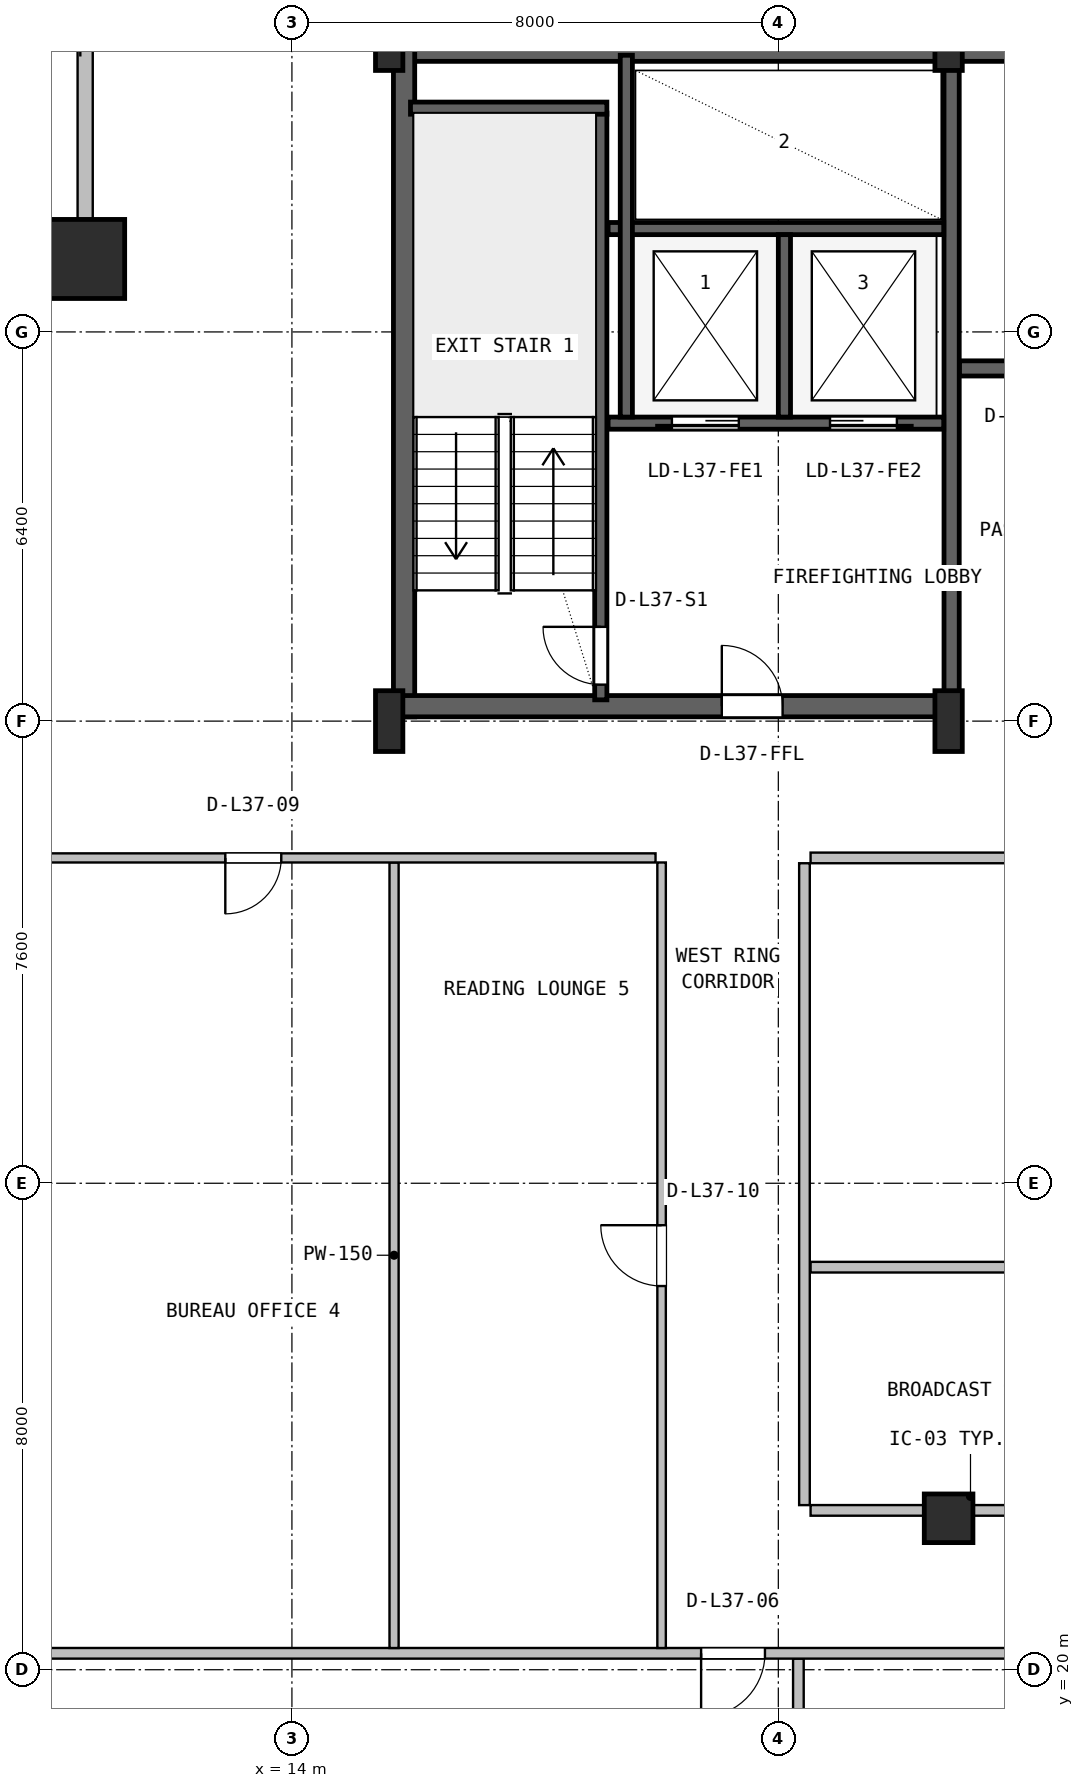
"""IFC4 building model, lengths in metres.
Left out: names, types, materials, properties, quantities, classifications, styles, units other than length and angle.
Written with IfcOpenShell. Run it as: python <this file> out.ifc"""

import sys

from ifc_helpers import new_model, si_unit, direction, frame, frame_2d, origin, origin_2d, place, context, subcontext, project, spatial, rectangle, hollow_rectangle, i_section, extrude, source, transform, mapped, element, fill, save


model = new_model("IFC4")
c1 = context("Model", 3, precision=1e-05, world=origin(), true_north=direction((0.0, 1.0)))
c2 = subcontext(c1, "Body", "Model", "MODEL_VIEW")
j1 = project(units=[si_unit("LENGTHUNIT", "METRE"), si_unit("PLANEANGLEUNIT", "RADIAN")], contexts=[c1])
p1 = place(None, origin())
s1 = spatial("IfcSite", under=j1, at=p1, CompositionType="ELEMENT")
p2 = place(p1, origin())
s2 = spatial("IfcBuilding", under=s1, at=p2, CompositionType="ELEMENT")
p3 = place(p2, frame((0.0, 0.0, 153.4)))
s3 = spatial("IfcBuildingStorey", under=s2, at=p3, CompositionType="ELEMENT", Elevation=153.4)
p4 = place(p3, frame((15.6, 46.625, 0.0), z_axis=(0.0, 0.0, 1.0), x_axis=(1.0, 0.0, 0.0)))
e1 = element("IfcWall", 1, at=p4, inside=s3, PredefinedType="SHEAR", context=c2, shape_type="SweptSolid", body=[
    extrude(rectangle(XDim=36.8, YDim=0.35, at=frame_2d((18.4, 0.0))), origin(), (0.0, 0.0, 1.0), 3.55),
])
p5 = place(p3, frame((15.845, 35.67, 0.0), z_axis=(0.0, 0.0, 1.0), x_axis=(0.0, 1.0, 0.0)))
e2 = element("IfcWall", 2, at=p5, inside=s3, PredefinedType="SHEAR", context=c2, shape_type="SweptSolid", body=[
    extrude(rectangle(XDim=11.13, YDim=0.35, at=frame_2d((5.565, 0.0))), origin(), (0.0, 0.0, 1.0), 3.55),
])
p6 = place(p3, frame((15.67, 35.845, 0.0), z_axis=(0.0, 0.0, 1.0), x_axis=(1.0, 0.0, 0.0)))
e3 = element("IfcWall", 3, at=p6, inside=s3, PredefinedType="SHEAR", context=c2, shape_type="SweptSolid", body=[
    extrude(rectangle(XDim=9.13, YDim=0.35, at=frame_2d((4.565, 0.0))), origin(), (0.0, 0.0, 1.0), 3.55),
])
p7 = place(p6, frame((5.4, 0.0, 0.0)))
e4 = element("IfcOpeningElement", 4, at=p7, cuts=e3, PredefinedType="OPENING", context=c2, shape_type="SweptSolid", body=[
    extrude(rectangle(XDim=1.0, YDim=2.1, at=frame_2d((0.5, 1.05))), frame((0.0, 0.185, 0.0), z_axis=(0.0, -1.0, 0.0), x_axis=(1.0, 0.0, 0.0)), (0.0, 0.0, 1.0), 0.37),
])
m1 = source(origin(), c2, "Body", "SweptSolid", [
    extrude(i_section(OverallWidth=0.45, OverallDepth=1.0, WebThickness=0.016, FlangeThickness=0.03, FilletRadius=0.016, at=origin_2d()), origin(), (0.0, 0.0, 1.0), 3.8),
])
for number, where, z_axis, x_axis in (
    (5, (15.6, 35.6, 0.0), (0.0, 0.0, 1.0), (1.0, 0.0, 0.0)),
    (6, (15.6, 46.8, 0.0), (0.0, 0.0, 1.0), (1.0, 0.0, 0.0)),
    (7, (24.8, 35.6, 0.0), (0.0, 0.0, 1.0), (1.0, 0.0, 0.0)),
    (8, (24.8, 46.8, 0.0), (0.0, 0.0, 1.0), (1.0, 0.0, 0.0)),
):
    element("IfcColumn", number, at=place(p3, frame(where, z_axis=z_axis, x_axis=x_axis)), inside=s3, PredefinedType="COLUMN", context=c2, shape_type="MappedRepresentation", body=[
        mapped(m1, transform((0.0, 0.0, 0.0), x_axis=(1.0, 0.0, 0.0), y_axis=(0.0, 1.0, 0.0), z_axis=(0.0, 0.0, 1.0), scale=1.0)),
    ])
m2 = source(origin(), c2, "Body", "SweptSolid", [
    extrude(hollow_rectangle(XDim=1.3, YDim=1.3, WallThickness=0.05, at=origin_2d()), origin(), (0.0, 0.0, 1.0), 3.8),
])
p8 = place(p3, frame((10.6, 43.2, 0.0), z_axis=(0.0, 0.0, 1.0), x_axis=(1.0, 0.0, 0.0)))
e9 = element("IfcColumn", 9, at=p8, inside=s3, PredefinedType="COLUMN", context=c2, shape_type="MappedRepresentation", body=[
    mapped(m2, transform((0.0, 0.0, 0.0), x_axis=(1.0, 0.0, 0.0), y_axis=(0.0, 1.0, 0.0), z_axis=(0.0, 0.0, 1.0), scale=1.0)),
])
m3 = source(origin(), c2, "Body", "SweptSolid", [
    extrude(rectangle(XDim=0.8, YDim=0.8, at=origin_2d()), origin(), (0.0, 0.0, 1.0), 3.8),
])
p9 = place(p3, frame((24.8, 22.49, 0.0), z_axis=(0.0, 0.0, 1.0), x_axis=(1.0, 0.0, 0.0)))
e10 = element("IfcColumn", 10, at=p9, inside=s3, PredefinedType="COLUMN", context=c2, shape_type="MappedRepresentation", body=[
    mapped(m3, transform((0.0, 0.0, 0.0), x_axis=(1.0, 0.0, 0.0), y_axis=(0.0, 1.0, 0.0), z_axis=(0.0, 0.0, 1.0), scale=1.0)),
])
p10 = place(p3, frame((7.08, 43.2, 0.0), z_axis=(0.0, 0.0, 1.0), x_axis=(1.0, 0.0, 0.0)))
e11 = element("IfcWall", 11, at=p10, inside=s3, PredefinedType="SOLIDWALL", context=c2, shape_type="SweptSolid", body=[
    extrude(rectangle(XDim=3.39, YDim=0.25, at=frame_2d((1.695, 0.0))), origin(), (0.0, 0.0, 1.0), 3.53),
])
p11 = place(p3, frame((10.6, 43.12, 0.0), z_axis=(0.0, 0.0, 1.0), x_axis=(0.0, 1.0, 0.0)))
e12 = element("IfcWall", 12, at=p11, inside=s3, PredefinedType="SOLIDWALL", context=c2, shape_type="SweptSolid", body=[
    extrude(rectangle(XDim=3.6, YDim=0.25, at=frame_2d((1.8, 0.0))), origin(), (0.0, 0.0, 1.0), 3.108),
])
p12 = place(p3, frame((19.08, 35.95, 0.0), z_axis=(0.0, 0.0, 1.0), x_axis=(0.0, 1.0, 0.0)))
e13 = element("IfcWall", 13, at=p12, inside=s3, PredefinedType="SHEAR", context=c2, shape_type="SweptSolid", body=[
    extrude(rectangle(XDim=9.65, YDim=0.2, at=frame_2d((4.825, 0.0))), origin(), (0.0, 0.0, 1.0), 3.55),
])
p13 = place(p12, frame((0.25, 0.0, 0.0)))
e14 = element("IfcOpeningElement", 14, at=p13, cuts=e13, PredefinedType="OPENING", context=c2, shape_type="SweptSolid", body=[
    extrude(rectangle(XDim=0.95, YDim=2.1, at=frame_2d((0.475, 1.05))), frame((0.0, 0.11, 0.0), z_axis=(0.0, -1.0, 0.0), x_axis=(1.0, 0.0, 0.0)), (0.0, 0.0, 1.0), 0.22),
])
p14 = place(p3, frame((15.95, 45.68, 0.0), z_axis=(0.0, 0.0, 1.0), x_axis=(1.0, 0.0, 0.0)))
e15 = element("IfcWall", 15, at=p14, inside=s3, PredefinedType="SHEAR", context=c2, shape_type="SweptSolid", body=[
    extrude(rectangle(XDim=3.23, YDim=0.2, at=frame_2d((1.615, 0.0))), origin(), (0.0, 0.0, 1.0), 3.55),
])
p15 = place(p3, frame((24.85, 36.05, 0.0), z_axis=(0.0, 0.0, 1.0), x_axis=(0.0, 1.0, 0.0)))
e16 = element("IfcWall", 16, at=p15, inside=s3, PredefinedType="SHEAR", context=c2, shape_type="SweptSolid", body=[
    extrude(rectangle(XDim=10.45, YDim=0.25, at=frame_2d((5.225, 0.0))), origin(), (0.0, 0.0, 1.0), 3.55),
])
p16 = place(p3, frame((19.2, 40.5, 0.0), z_axis=(0.0, 0.0, 1.0), x_axis=(1.0, 0.0, 0.0)))
e17 = element("IfcWall", 17, at=p16, inside=s3, PredefinedType="SHEAR", context=c2, shape_type="SweptSolid", body=[
    extrude(rectangle(XDim=5.52, YDim=0.2, at=frame_2d((2.76, 0.0))), origin(), (0.0, 0.0, 1.0), 3.55),
])
p17 = place(p16, frame((1.05, 0.0, 0.0)))
e18 = element("IfcOpeningElement", 18, at=p17, cuts=e17, PredefinedType="OPENING", context=c2, shape_type="SweptSolid", body=[
    extrude(rectangle(XDim=1.1, YDim=2.18, at=frame_2d((0.55, 1.09))), frame((0.0, 0.11, 0.0), z_axis=(0.0, -1.0, 0.0), x_axis=(1.0, 0.0, 0.0)), (0.0, 0.0, 1.0), 0.22),
])
p18 = place(p16, frame((3.65, 0.0, 0.0)))
e19 = element("IfcOpeningElement", 19, at=p18, cuts=e17, PredefinedType="OPENING", context=c2, shape_type="SweptSolid", body=[
    extrude(rectangle(XDim=1.1, YDim=2.18, at=frame_2d((0.55, 1.09))), frame((0.0, 0.11, 0.0), z_axis=(0.0, -1.0, 0.0), x_axis=(1.0, 0.0, 0.0)), (0.0, 0.0, 1.0), 0.22),
])
p19 = place(p3, frame((19.2, 43.7, 0.0), z_axis=(0.0, 0.0, 1.0), x_axis=(1.0, 0.0, 0.0)))
e20 = element("IfcWall", 20, at=p19, inside=s3, PredefinedType="SHEAR", context=c2, shape_type="SweptSolid", body=[
    extrude(rectangle(XDim=5.52, YDim=0.2, at=frame_2d((2.76, 0.0))), origin(), (0.0, 0.0, 1.0), 3.55),
])
p20 = place(p3, frame((22.1, 40.6, 0.0), z_axis=(0.0, 0.0, 1.0), x_axis=(0.0, 1.0, 0.0)))
e21 = element("IfcWall", 21, at=p20, inside=s3, PredefinedType="SHEAR", context=c2, shape_type="SweptSolid", body=[
    extrude(rectangle(XDim=3.0, YDim=0.2, at=frame_2d((1.5, 0.0))), origin(), (0.0, 0.0, 1.0), 3.55),
])
p21 = place(p3, frame((19.5, 40.6, 0.0), z_axis=(0.0, 0.0, 1.0), x_axis=(0.0, 1.0, 0.0)))
e22 = element("IfcWall", 22, at=p21, inside=s3, PredefinedType="SHEAR", context=c2, shape_type="SweptSolid", body=[
    extrude(rectangle(XDim=5.95, YDim=0.2, at=frame_2d((2.975, 0.0))), origin(), (0.0, 0.0, 1.0), 3.55),
])
p22 = place(p3, frame((24.98, 41.4, 0.0), z_axis=(0.0, 0.0, 1.0), x_axis=(1.0, 0.0, 0.0)))
e23 = element("IfcWall", 23, at=p22, inside=s3, PredefinedType="SHEAR", context=c2, shape_type="SweptSolid", body=[
    extrude(rectangle(XDim=23.82, YDim=0.25, at=frame_2d((11.91, 0.0))), origin(), (0.0, 0.0, 1.0), 3.55),
])
p23 = place(p22, frame((8.87, 0.0, 0.0)))
e24 = element("IfcOpeningElement", 24, at=p23, cuts=e23, PredefinedType="OPENING", context=c2, shape_type="SweptSolid", body=[
    extrude(rectangle(XDim=1.1, YDim=2.18, at=frame_2d((0.55, 1.09))), frame((0.0, 0.135, 0.0), z_axis=(0.0, -1.0, 0.0), x_axis=(1.0, 0.0, 0.0)), (0.0, 0.0, 1.0), 0.27),
])
p24 = place(p22, frame((11.47, 0.0, 0.0)))
e25 = element("IfcOpeningElement", 25, at=p24, cuts=e23, PredefinedType="OPENING", context=c2, shape_type="SweptSolid", body=[
    extrude(rectangle(XDim=1.1, YDim=2.18, at=frame_2d((0.55, 1.09))), frame((0.0, 0.135, 0.0), z_axis=(0.0, -1.0, 0.0), x_axis=(1.0, 0.0, 0.0)), (0.0, 0.0, 1.0), 0.27),
])
p25 = place(p22, frame((14.07, 0.0, 0.0)))
e26 = element("IfcOpeningElement", 26, at=p25, cuts=e23, PredefinedType="OPENING", context=c2, shape_type="SweptSolid", body=[
    extrude(rectangle(XDim=1.1, YDim=2.18, at=frame_2d((0.55, 1.09))), frame((0.0, 0.135, 0.0), z_axis=(0.0, -1.0, 0.0), x_axis=(1.0, 0.0, 0.0)), (0.0, 0.0, 1.0), 0.27),
])
p26 = place(p22, frame((0.96, 0.0, 0.0)))
e27 = element("IfcOpeningElement", 27, at=p26, cuts=e23, PredefinedType="OPENING", context=c2, shape_type="SweptSolid", body=[
    extrude(rectangle(XDim=1.0, YDim=2.08, at=frame_2d((0.5, 1.04))), frame((0.0, 0.135, 0.0), z_axis=(0.0, -1.0, 0.0), x_axis=(1.0, 0.0, 0.0)), (0.0, 0.0, 1.0), 0.27),
])
p27 = place(p22, frame((3.56, 0.0, 0.0)))
e28 = element("IfcOpeningElement", 28, at=p27, cuts=e23, PredefinedType="OPENING", context=c2, shape_type="SweptSolid", body=[
    extrude(rectangle(XDim=1.0, YDim=2.08, at=frame_2d((0.5, 1.04))), frame((0.0, 0.135, 0.0), z_axis=(0.0, -1.0, 0.0), x_axis=(1.0, 0.0, 0.0)), (0.0, 0.0, 1.0), 0.27),
])
p28 = place(p22, frame((6.16, 0.0, 0.0)))
e29 = element("IfcOpeningElement", 29, at=p28, cuts=e23, PredefinedType="OPENING", context=c2, shape_type="SweptSolid", body=[
    extrude(rectangle(XDim=0.92, YDim=2.08, at=frame_2d((0.46, 1.04))), frame((0.0, 0.135, 0.0), z_axis=(0.0, -1.0, 0.0), x_axis=(1.0, 0.0, 0.0)), (0.0, 0.0, 1.0), 0.27),
])
p29 = place(p3, frame((22.33, 7.38, 0.0), z_axis=(0.0, 0.0, 1.0), x_axis=(0.0, 1.0, 0.0)))
e30 = element("IfcWall", 30, at=p29, inside=s3, PredefinedType="PARTITIONING", context=c2, shape_type="SweptSolid", body=[
    extrude(rectangle(XDim=12.803, YDim=0.175, at=frame_2d((6.402, 0.0))), origin(), (0.0, 0.0, 1.0), 3.108),
])
p30 = place(p3, frame((7.18, 20.27, 0.0), z_axis=(0.0, 0.0, 1.0), x_axis=(1.0, 0.0, 0.0)))
e31 = element("IfcWall", 31, at=p30, inside=s3, PredefinedType="PARTITIONING", context=c2, shape_type="SweptSolid", body=[
    extrude(rectangle(XDim=53.64, YDim=0.175, at=frame_2d((26.82, 0.0))), origin(), (0.0, 0.0, 1.0), 2.909),
])
p31 = place(p30, frame((13.55, 0.0, 0.0)))
e32 = element("IfcOpeningElement", 32, at=p31, cuts=e31, PredefinedType="OPENING", context=c2, shape_type="SweptSolid", body=[
    extrude(rectangle(XDim=1.05, YDim=2.1, at=frame_2d((0.525, 1.05))), frame((0.0, 0.098, 0.0), z_axis=(0.0, -1.0, 0.0), x_axis=(1.0, 0.0, 0.0)), (0.0, 0.0, 1.0), 0.195),
])
p32 = place(p30, frame((25.795, 0.0, 0.0)))
e33 = element("IfcOpeningElement", 33, at=p32, cuts=e31, PredefinedType="OPENING", context=c2, shape_type="SweptSolid", body=[
    extrude(rectangle(XDim=1.4, YDim=2.12, at=frame_2d((0.7, 1.06))), frame((0.0, 0.098, 0.0), z_axis=(0.0, -1.0, 0.0), x_axis=(1.0, 0.0, 0.0)), (0.0, 0.0, 1.0), 0.195),
])
p33 = place(p30, frame((38.475, 0.0, 0.0)))
e34 = element("IfcOpeningElement", 34, at=p33, cuts=e31, PredefinedType="OPENING", context=c2, shape_type="SweptSolid", body=[
    extrude(rectangle(XDim=0.88, YDim=2.06, at=frame_2d((0.44, 1.03))), frame((0.0, 0.098, 0.0), z_axis=(0.0, -1.0, 0.0), x_axis=(1.0, 0.0, 0.0)), (0.0, 0.0, 1.0), 0.195),
])
p34 = place(p3, frame((15.68, 20.357, 0.0), z_axis=(0.0, 0.0, 1.0), x_axis=(0.0, 1.0, 0.0)))
e35 = element("IfcWall", 35, at=p34, inside=s3, PredefinedType="PARTITIONING", context=c2, shape_type="SweptSolid", body=[
    extrude(rectangle(XDim=12.918, YDim=0.15, at=frame_2d((6.459, 0.0))), origin(), (0.0, 0.0, 1.0), 3.222),
])
p35 = place(p3, frame((7.18, 33.35, 0.0), z_axis=(0.0, 0.0, 1.0), x_axis=(1.0, 0.0, 0.0)))
e36 = element("IfcWall", 36, at=p35, inside=s3, PredefinedType="PARTITIONING", context=c2, shape_type="SweptSolid", body=[
    extrude(rectangle(XDim=12.8, YDim=0.15, at=frame_2d((6.4, 0.0))), origin(), (0.0, 0.0, 1.0), 3.108),
])
p36 = place(p35, frame((5.725, 0.0, 0.0)))
e37 = element("IfcOpeningElement", 37, at=p36, cuts=e36, PredefinedType="OPENING", context=c2, shape_type="SweptSolid", body=[
    extrude(rectangle(XDim=0.92, YDim=2.08, at=frame_2d((0.46, 1.04))), frame((0.0, 0.085, 0.0), z_axis=(0.0, -1.0, 0.0), x_axis=(1.0, 0.0, 0.0)), (0.0, 0.0, 1.0), 0.17),
])
p37 = place(p3, frame((20.08, 20.357, 0.0), z_axis=(0.0, 0.0, 1.0), x_axis=(0.0, 1.0, 0.0)))
e38 = element("IfcWall", 38, at=p37, inside=s3, PredefinedType="PARTITIONING", context=c2, shape_type="SweptSolid", body=[
    extrude(rectangle(XDim=12.918, YDim=0.14, at=frame_2d((6.459, 0.0))), origin(), (0.0, 0.0, 1.0), 3.222),
])
p38 = place(p37, frame((5.953, 0.0, 0.0)))
e39 = element("IfcOpeningElement", 39, at=p38, cuts=e38, PredefinedType="OPENING", context=c2, shape_type="SweptSolid", body=[
    extrude(rectangle(XDim=1.0, YDim=2.1, at=frame_2d((0.5, 1.05))), frame((0.0, 0.08, 0.0), z_axis=(0.0, -1.0, 0.0), x_axis=(1.0, 0.0, 0.0)), (0.0, 0.0, 1.0), 0.16),
])
p39 = place(p3, frame((22.53, 22.62, 0.0), z_axis=(0.0, 0.0, 1.0), x_axis=(1.0, 0.0, 0.0)))
e40 = element("IfcWall", 40, at=p39, inside=s3, PredefinedType="PARTITIONING", context=c2, shape_type="SweptSolid", body=[
    extrude(rectangle(XDim=22.29, YDim=0.175, at=frame_2d((11.145, 0.0))), origin(), (0.0, 0.0, 1.0), 2.909),
])
p40 = place(p39, frame((10.62, 0.0, 0.0)))
e41 = element("IfcOpeningElement", 41, at=p40, cuts=e40, PredefinedType="OPENING", context=c2, shape_type="SweptSolid", body=[
    extrude(rectangle(XDim=1.05, YDim=2.1, at=frame_2d((0.525, 1.05))), frame((0.0, 0.098, 0.0), z_axis=(0.0, -1.0, 0.0), x_axis=(1.0, 0.0, 0.0)), (0.0, 0.0, 1.0), 0.195),
])
p41 = place(p3, frame((22.53, 26.62, 0.0), z_axis=(0.0, 0.0, 1.0), x_axis=(1.0, 0.0, 0.0)))
e42 = element("IfcWall", 42, at=p41, inside=s3, PredefinedType="PARTITIONING", context=c2, shape_type="SweptSolid", body=[
    extrude(rectangle(XDim=22.29, YDim=0.175, at=frame_2d((11.145, 0.0))), origin(), (0.0, 0.0, 1.0), 2.909),
])
p42 = place(p3, frame((22.43, 22.707, 0.0), z_axis=(0.0, 0.0, 1.0), x_axis=(0.0, 1.0, 0.0)))
e43 = element("IfcWall", 43, at=p42, inside=s3, PredefinedType="PARTITIONING", context=c2, shape_type="SweptSolid", body=[
    extrude(rectangle(XDim=10.556, YDim=0.175, at=frame_2d((5.278, 0.0))), origin(), (0.0, 0.0, 1.0), 3.222),
])
p43 = place(p3, frame((22.53, 33.35, 0.0), z_axis=(0.0, 0.0, 1.0), x_axis=(1.0, 0.0, 0.0)))
e44 = element("IfcWall", 44, at=p43, inside=s3, PredefinedType="PARTITIONING", context=c2, shape_type="SweptSolid", body=[
    extrude(rectangle(XDim=22.29, YDim=0.175, at=frame_2d((11.145, 0.0))), origin(), (0.0, 0.0, 1.0), 2.909),
])
p44 = place(p43, frame((10.62, 0.0, 0.0)))
e45 = element("IfcOpeningElement", 45, at=p44, cuts=e44, PredefinedType="OPENING", context=c2, shape_type="SweptSolid", body=[
    extrude(rectangle(XDim=1.05, YDim=2.1, at=frame_2d((0.525, 1.05))), frame((0.0, 0.098, 0.0), z_axis=(0.0, -1.0, 0.0), x_axis=(1.0, 0.0, 0.0)), (0.0, 0.0, 1.0), 0.195),
])
m4 = source(origin(), c2, "Body", "SweptSolid", [
    extrude(rectangle(XDim=0.95, YDim=2.1, at=frame_2d((0.475, 1.05))), frame((0.0, 0.025, 0.0), z_axis=(0.0, -1.0, 0.0), x_axis=(1.0, 0.0, 0.0)), (0.0, 0.0, 1.0), 0.05),
])
p45 = place(p13, origin())
e46 = element("IfcDoor", 46, at=p45, inside=s3, OperationType="SINGLE_SWING_RIGHT", PredefinedType="DOOR", context=c2, shape_type="MappedRepresentation", body=[
    mapped(m4, transform((0.0, 0.0, 0.0), x_axis=(1.0, 0.0, 0.0), y_axis=(0.0, 1.0, 0.0), z_axis=(0.0, 0.0, 1.0), scale=1.0)),
])
fill(e14, e46)
m5 = source(origin(), c2, "Body", "SweptSolid", [
    extrude(rectangle(XDim=1.0, YDim=2.1, at=frame_2d((0.5, 1.05))), frame((0.0, 0.025, 0.0), z_axis=(0.0, -1.0, 0.0), x_axis=(1.0, 0.0, 0.0)), (0.0, 0.0, 1.0), 0.05),
])
p46 = place(p7, origin())
e47 = element("IfcDoor", 47, at=p46, inside=s3, OperationType="SINGLE_SWING_LEFT", PredefinedType="DOOR", context=c2, shape_type="MappedRepresentation", body=[
    mapped(m5, transform((0.0, 0.0, 0.0), x_axis=(1.0, 0.0, 0.0), y_axis=(0.0, 1.0, 0.0), z_axis=(0.0, 0.0, 1.0), scale=1.0)),
])
fill(e4, e47)
m6 = source(origin(), c2, "Body", "SweptSolid", [
    extrude(rectangle(XDim=1.1, YDim=2.18, at=frame_2d((0.55, 1.09))), frame((0.0, 0.025, 0.0), z_axis=(0.0, -1.0, 0.0), x_axis=(1.0, 0.0, 0.0)), (0.0, 0.0, 1.0), 0.05),
])
p47 = place(p17, frame((1.1, 0.0, 0.0), z_axis=(0.0, 0.0, 1.0), x_axis=(-1.0, 0.0, 0.0)))
e48 = element("IfcDoor", 48, at=p47, inside=s3, OperationType="SLIDING_TO_LEFT", PredefinedType="DOOR", context=c2, shape_type="MappedRepresentation", body=[
    mapped(m6, transform((0.0, 0.0, 0.0), x_axis=(1.0, 0.0, 0.0), y_axis=(0.0, 1.0, 0.0), z_axis=(0.0, 0.0, 1.0), scale=1.0)),
])
fill(e18, e48)
p48 = place(p18, frame((1.1, 0.0, 0.0), z_axis=(0.0, 0.0, 1.0), x_axis=(-1.0, 0.0, 0.0)))
e49 = element("IfcDoor", 49, at=p48, inside=s3, OperationType="SLIDING_TO_RIGHT", PredefinedType="DOOR", context=c2, shape_type="MappedRepresentation", body=[
    mapped(m6, transform((0.0, 0.0, 0.0), x_axis=(1.0, 0.0, 0.0), y_axis=(0.0, 1.0, 0.0), z_axis=(0.0, 0.0, 1.0), scale=1.0)),
])
fill(e19, e49)
m7 = source(origin(), c2, "Body", "SweptSolid", [
    extrude(rectangle(XDim=1.05, YDim=2.1, at=frame_2d((0.525, 1.05))), frame((0.0, 0.025, 0.0), z_axis=(0.0, -1.0, 0.0), x_axis=(1.0, 0.0, 0.0)), (0.0, 0.0, 1.0), 0.05),
])
p49 = place(p31, frame((1.05, 0.0, 0.0), z_axis=(0.0, 0.0, 1.0), x_axis=(-1.0, 0.0, 0.0)))
e50 = element("IfcDoor", 50, at=p49, inside=s3, OperationType="SINGLE_SWING_LEFT", PredefinedType="DOOR", context=c2, shape_type="MappedRepresentation", body=[
    mapped(m7, transform((0.0, 0.0, 0.0), x_axis=(1.0, 0.0, 0.0), y_axis=(0.0, 1.0, 0.0), z_axis=(0.0, 0.0, 1.0), scale=1.0)),
])
fill(e32, e50)
m8 = source(origin(), c2, "Body", "SweptSolid", [
    extrude(rectangle(XDim=0.92, YDim=2.08, at=frame_2d((0.46, 1.04))), frame((0.0, 0.025, 0.0), z_axis=(0.0, -1.0, 0.0), x_axis=(1.0, 0.0, 0.0)), (0.0, 0.0, 1.0), 0.05),
])
p50 = place(p36, frame((0.92, 0.0, 0.0), z_axis=(0.0, 0.0, 1.0), x_axis=(-1.0, 0.0, 0.0)))
e51 = element("IfcDoor", 51, at=p50, inside=s3, OperationType="SINGLE_SWING_LEFT", PredefinedType="DOOR", context=c2, shape_type="MappedRepresentation", body=[
    mapped(m8, transform((0.0, 0.0, 0.0), x_axis=(1.0, 0.0, 0.0), y_axis=(0.0, 1.0, 0.0), z_axis=(0.0, 0.0, 1.0), scale=1.0)),
])
fill(e37, e51)
m9 = source(origin(), c2, "Body", "SweptSolid", [
    extrude(rectangle(XDim=1.0, YDim=2.1, at=frame_2d((0.5, 1.05))), frame((0.0, 0.025, 0.0), z_axis=(0.0, -1.0, 0.0), x_axis=(1.0, 0.0, 0.0)), (0.0, 0.0, 1.0), 0.05),
])
p51 = place(p38, origin())
e52 = element("IfcDoor", 52, at=p51, inside=s3, OperationType="SINGLE_SWING_RIGHT", PredefinedType="DOOR", context=c2, shape_type="MappedRepresentation", body=[
    mapped(m9, transform((0.0, 0.0, 0.0), x_axis=(1.0, 0.0, 0.0), y_axis=(0.0, 1.0, 0.0), z_axis=(0.0, 0.0, 1.0), scale=1.0)),
])
fill(e39, e52)
save(model, sys.argv[1])
